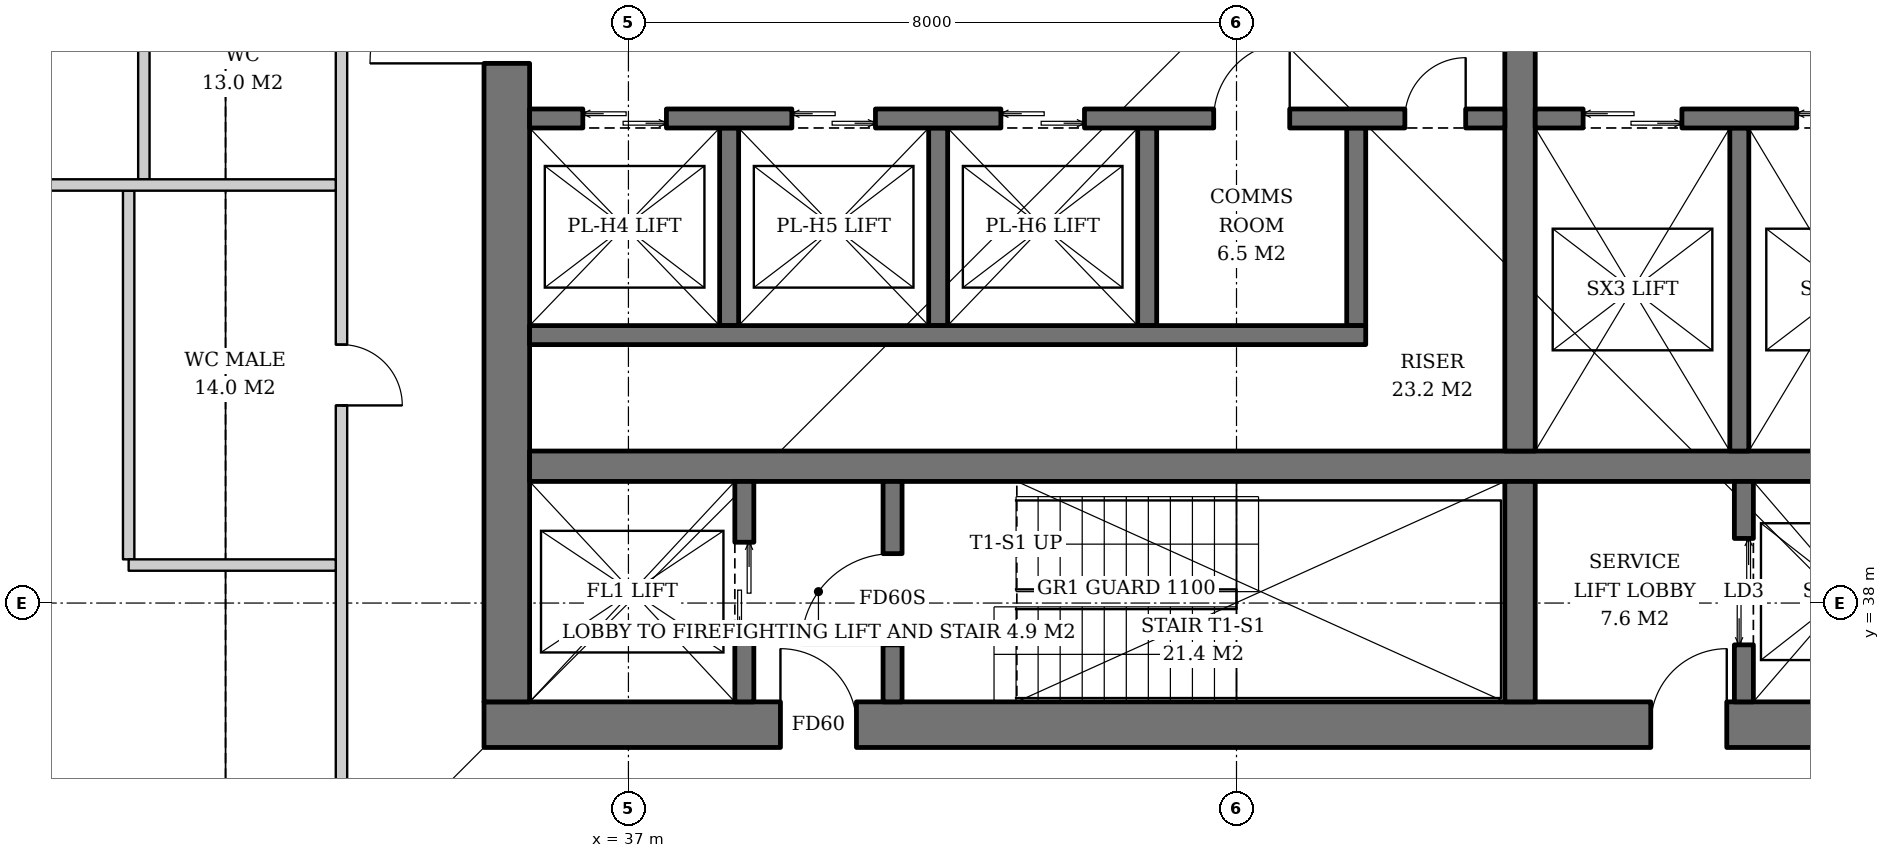
"""IFC4 building model, lengths in metres.
Left out: names, types, materials, properties, quantities, classifications, styles, units other than length and angle.
Written with IfcOpenShell. Run it as: python <this file> out.ifc"""

import sys

from ifc_helpers import new_model, si_unit, direction, frame, frame_2d, origin, place, context, subcontext, project, spatial, rectangle, extrude, element, fill, save


model = new_model("IFC4")
c1 = context("Model", 3, precision=1e-05, world=origin(), true_north=direction((0.0, 1.0)))
c2 = subcontext(c1, "Body", "Model", "MODEL_VIEW")
j1 = project(units=[si_unit("LENGTHUNIT", "METRE"), si_unit("PLANEANGLEUNIT", "RADIAN")], contexts=[c1])
p1 = place(None, origin())
s1 = spatial("IfcSite", under=j1, at=p1, CompositionType="ELEMENT")
p2 = place(p1, origin())
s2 = spatial("IfcBuilding", under=s1, at=p2, CompositionType="ELEMENT")
p3 = place(p2, frame((0.0, 0.0, 165.4)))
s3 = spatial("IfcBuildingStorey", under=s2, at=p3, CompositionType="ELEMENT", Elevation=165.4)
p4 = place(p3, frame((35.1, 36.4, 0.0), z_axis=(0.0, 0.0, 1.0), x_axis=(1.0, 0.0, 0.0)))
e1 = element("IfcWall", 1, at=p4, inside=s3, PredefinedType="SHEAR", context=c2, shape_type="SweptSolid", body=[
    extrude(rectangle(XDim=19.8, YDim=0.6, at=frame_2d((9.9, 0.0))), origin(), (0.0, 0.0, 1.0), 3.8),
])
p5 = place(p4, frame((3.9, 0.0, 0.0)))
e2 = element("IfcOpeningElement", 2, at=p5, cuts=e1, PredefinedType="OPENING", context=c2, shape_type="SweptSolid", body=[
    extrude(rectangle(XDim=1.0, YDim=2.1, at=frame_2d((0.5, 1.05))), frame((0.0, 0.31, 0.0), z_axis=(0.0, -1.0, 0.0), x_axis=(1.0, 0.0, 0.0)), (0.0, 0.0, 1.0), 0.62),
])
p6 = place(p4, frame((15.35, 0.0, 0.0)))
e3 = element("IfcOpeningElement", 3, at=p6, cuts=e1, PredefinedType="OPENING", context=c2, shape_type="SweptSolid", body=[
    extrude(rectangle(XDim=1.0, YDim=2.1, at=frame_2d((0.5, 1.05))), frame((0.0, 0.31, 0.0), z_axis=(0.0, -1.0, 0.0), x_axis=(1.0, 0.0, 0.0)), (0.0, 0.0, 1.0), 0.62),
])
p7 = place(p3, frame((35.4, 36.7, 0.0), z_axis=(0.0, 0.0, 1.0), x_axis=(0.0, 1.0, 0.0)))
e4 = element("IfcWall", 4, at=p7, inside=s3, PredefinedType="SHEAR", context=c2, shape_type="SweptSolid", body=[
    extrude(rectangle(XDim=18.6, YDim=0.6, at=frame_2d((9.3, 0.0))), origin(), (0.0, 0.0, 1.0), 3.8),
])
p8 = place(p7, frame((8.4, 0.0, 0.0)))
e5 = element("IfcOpeningElement", 5, at=p8, cuts=e4, PredefinedType="OPENING", context=c2, shape_type="SweptSolid", body=[
    extrude(rectangle(XDim=1.8, YDim=2.4, at=frame_2d((0.9, 1.2))), frame((0.0, 0.31, 0.0), z_axis=(0.0, -1.0, 0.0), x_axis=(1.0, 0.0, 0.0)), (0.0, 0.0, 1.0), 0.62),
])
p9 = place(p3, frame((35.7, 39.8, 0.0), z_axis=(0.0, 0.0, 1.0), x_axis=(1.0, 0.0, 0.0)))
e6 = element("IfcWall", 6, at=p9, inside=s3, PredefinedType="SHEAR", context=c2, shape_type="SweptSolid", body=[
    extrude(rectangle(XDim=18.6, YDim=0.4, at=frame_2d((9.3, 0.0))), origin(), (0.0, 0.0, 1.0), 3.8),
])
p10 = place(p3, frame((48.73, 36.7, 0.0), z_axis=(0.0, 0.0, 1.0), x_axis=(0.0, 1.0, 0.0)))
e7 = element("IfcWall", 7, at=p10, inside=s3, PredefinedType="SHEAR", context=c2, shape_type="SweptSolid", body=[
    extrude(rectangle(XDim=2.9, YDim=0.4, at=frame_2d((1.45, 0.0))), origin(), (0.0, 0.0, 1.0), 3.8),
])
p11 = place(p3, frame((48.73, 40.0, 0.0), z_axis=(0.0, 0.0, 1.0), x_axis=(0.0, 1.0, 0.0)))
e8 = element("IfcWall", 8, at=p11, inside=s3, PredefinedType="SHEAR", context=c2, shape_type="SweptSolid", body=[
    extrude(rectangle(XDim=12.0, YDim=0.4, at=frame_2d((6.0, 0.0))), origin(), (0.0, 0.0, 1.0), 3.8),
])
p12 = place(p3, frame((38.525, 36.7, 0.0), z_axis=(0.0, 0.0, 1.0), x_axis=(0.0, 1.0, 0.0)))
e9 = element("IfcWall", 9, at=p12, inside=s3, PredefinedType="SHEAR", context=c2, shape_type="SweptSolid", body=[
    extrude(rectangle(XDim=2.9, YDim=0.25, at=frame_2d((1.45, 0.0))), origin(), (0.0, 0.0, 1.0), 3.8),
])
p13 = place(p12, frame((0.8, 0.0, 0.0)))
e10 = element("IfcOpeningElement", 10, at=p13, cuts=e9, PredefinedType="OPENING", context=c2, shape_type="SweptSolid", body=[
    extrude(rectangle(XDim=1.3, YDim=2.2, at=frame_2d((0.65, 1.1))), frame((0.0, 0.135, 0.0), z_axis=(0.0, -1.0, 0.0), x_axis=(1.0, 0.0, 0.0)), (0.0, 0.0, 1.0), 0.27),
])
p14 = place(p3, frame((40.475, 36.7, 0.0), z_axis=(0.0, 0.0, 1.0), x_axis=(0.0, 1.0, 0.0)))
e11 = element("IfcWall", 11, at=p14, inside=s3, PredefinedType="SHEAR", context=c2, shape_type="SweptSolid", body=[
    extrude(rectangle(XDim=2.9, YDim=0.25, at=frame_2d((1.45, 0.0))), origin(), (0.0, 0.0, 1.0), 3.8),
])
p15 = place(p14, frame((0.75, 0.0, 0.0)))
e12 = element("IfcOpeningElement", 12, at=p15, cuts=e11, PredefinedType="OPENING", context=c2, shape_type="SweptSolid", body=[
    extrude(rectangle(XDim=1.2, YDim=2.1, at=frame_2d((0.6, 1.05))), frame((0.0, 0.135, 0.0), z_axis=(0.0, -1.0, 0.0), x_axis=(1.0, 0.0, 0.0)), (0.0, 0.0, 1.0), 0.27),
])
p16 = place(p3, frame((51.675, 36.7, 0.0), z_axis=(0.0, 0.0, 1.0), x_axis=(0.0, 1.0, 0.0)))
e13 = element("IfcWall", 13, at=p16, inside=s3, PredefinedType="SHEAR", context=c2, shape_type="SweptSolid", body=[
    extrude(rectangle(XDim=2.9, YDim=0.25, at=frame_2d((1.45, 0.0))), origin(), (0.0, 0.0, 1.0), 3.8),
])
p17 = place(p16, frame((0.75, 0.0, 0.0)))
e14 = element("IfcOpeningElement", 14, at=p17, cuts=e13, PredefinedType="OPENING", context=c2, shape_type="SweptSolid", body=[
    extrude(rectangle(XDim=1.4, YDim=2.4, at=frame_2d((0.7, 1.2))), frame((0.0, 0.135, 0.0), z_axis=(0.0, -1.0, 0.0), x_axis=(1.0, 0.0, 0.0)), (0.0, 0.0, 1.0), 0.27),
])
for number, where, z_axis, x_axis in (
    (15, (38.325, 44.25, 0.0), (0.0, 0.0, 1.0), (0.0, -1.0, 0.0)),
    (16, (41.075, 44.25, 0.0), (0.0, 0.0, 1.0), (0.0, -1.0, 0.0)),
    (17, (43.825, 44.25, 0.0), (0.0, 0.0, 1.0), (0.0, -1.0, 0.0)),
    (18, (46.575, 44.25, 0.0), (0.0, 0.0, 1.0), (0.0, -1.0, 0.0)),
):
    element("IfcWall", number, at=place(p3, frame(where, z_axis=z_axis, x_axis=x_axis)), inside=s3, PredefinedType="SHEAR", context=c2, shape_type="SweptSolid", body=[
        extrude(rectangle(XDim=2.6, YDim=0.25, at=frame_2d((1.3, 0.0))), origin(), (0.0, 0.0, 1.0), 3.8),
    ])
p18 = place(p3, frame((35.7, 41.525, 0.0), z_axis=(0.0, 0.0, 1.0), x_axis=(1.0, 0.0, 0.0)))
e19 = element("IfcWall", 19, at=p18, inside=s3, PredefinedType="SHEAR", context=c2, shape_type="SweptSolid", body=[
    extrude(rectangle(XDim=11.0, YDim=0.25, at=frame_2d((5.5, 0.0))), origin(), (0.0, 0.0, 1.0), 3.8),
])
p19 = place(p3, frame((35.7, 44.375, 0.0), z_axis=(0.0, 0.0, 1.0), x_axis=(1.0, 0.0, 0.0)))
e20 = element("IfcWall", 20, at=p19, inside=s3, PredefinedType="SHEAR", context=c2, shape_type="SweptSolid", body=[
    extrude(rectangle(XDim=12.83, YDim=0.25, at=frame_2d((6.415, 0.0))), origin(), (0.0, 0.0, 1.0), 3.8),
])
p20 = place(p19, frame((0.7, 0.0, 0.0)))
e21 = element("IfcOpeningElement", 21, at=p20, cuts=e20, PredefinedType="OPENING", context=c2, shape_type="SweptSolid", body=[
    extrude(rectangle(XDim=1.1, YDim=2.2, at=frame_2d((0.55, 1.1))), frame((0.0, 0.135, 0.0), z_axis=(0.0, -1.0, 0.0), x_axis=(1.0, 0.0, 0.0)), (0.0, 0.0, 1.0), 0.27),
])
p21 = place(p19, frame((3.45, 0.0, 0.0)))
e22 = element("IfcOpeningElement", 22, at=p21, cuts=e20, PredefinedType="OPENING", context=c2, shape_type="SweptSolid", body=[
    extrude(rectangle(XDim=1.1, YDim=2.2, at=frame_2d((0.55, 1.1))), frame((0.0, 0.135, 0.0), z_axis=(0.0, -1.0, 0.0), x_axis=(1.0, 0.0, 0.0)), (0.0, 0.0, 1.0), 0.27),
])
p22 = place(p19, frame((6.2, 0.0, 0.0)))
e23 = element("IfcOpeningElement", 23, at=p22, cuts=e20, PredefinedType="OPENING", context=c2, shape_type="SweptSolid", body=[
    extrude(rectangle(XDim=1.1, YDim=2.2, at=frame_2d((0.55, 1.1))), frame((0.0, 0.135, 0.0), z_axis=(0.0, -1.0, 0.0), x_axis=(1.0, 0.0, 0.0)), (0.0, 0.0, 1.0), 0.27),
])
p23 = place(p19, frame((9.0, 0.0, 0.0)))
e24 = element("IfcOpeningElement", 24, at=p23, cuts=e20, PredefinedType="OPENING", context=c2, shape_type="SweptSolid", body=[
    extrude(rectangle(XDim=1.0, YDim=2.1, at=frame_2d((0.5, 1.05))), frame((0.0, 0.135, 0.0), z_axis=(0.0, -1.0, 0.0), x_axis=(1.0, 0.0, 0.0)), (0.0, 0.0, 1.0), 0.27),
])
p24 = place(p19, frame((11.515, 0.0, 0.0)))
e25 = element("IfcOpeningElement", 25, at=p24, cuts=e20, PredefinedType="OPENING", context=c2, shape_type="SweptSolid", body=[
    extrude(rectangle(XDim=0.8, YDim=2.0, at=frame_2d((0.4, 1.0))), frame((0.0, 0.135, 0.0), z_axis=(0.0, -1.0, 0.0), x_axis=(1.0, 0.0, 0.0)), (0.0, 0.0, 1.0), 0.27),
])
p25 = place(p3, frame((51.615, 44.25, 0.0), z_axis=(0.0, 0.0, 1.0), x_axis=(0.0, -1.0, 0.0)))
e26 = element("IfcWall", 26, at=p25, inside=s3, PredefinedType="SHEAR", context=c2, shape_type="SweptSolid", body=[
    extrude(rectangle(XDim=4.25, YDim=0.25, at=frame_2d((2.125, 0.0))), origin(), (0.0, 0.0, 1.0), 3.8),
])
p26 = place(p3, frame((48.93, 44.375, 0.0), z_axis=(0.0, 0.0, 1.0), x_axis=(1.0, 0.0, 0.0)))
e27 = element("IfcWall", 27, at=p26, inside=s3, PredefinedType="SHEAR", context=c2, shape_type="SweptSolid", body=[
    extrude(rectangle(XDim=5.37, YDim=0.25, at=frame_2d((2.685, 0.0))), origin(), (0.0, 0.0, 1.0), 3.8),
])
p27 = place(p26, frame((0.63, 0.0, 0.0)))
e28 = element("IfcOpeningElement", 28, at=p27, cuts=e27, PredefinedType="OPENING", context=c2, shape_type="SweptSolid", body=[
    extrude(rectangle(XDim=1.3, YDim=2.2, at=frame_2d((0.65, 1.1))), frame((0.0, 0.135, 0.0), z_axis=(0.0, -1.0, 0.0), x_axis=(1.0, 0.0, 0.0)), (0.0, 0.0, 1.0), 0.27),
])
p28 = place(p26, frame((3.44, 0.0, 0.0)))
e29 = element("IfcOpeningElement", 29, at=p28, cuts=e27, PredefinedType="OPENING", context=c2, shape_type="SweptSolid", body=[
    extrude(rectangle(XDim=1.3, YDim=2.2, at=frame_2d((0.65, 1.1))), frame((0.0, 0.135, 0.0), z_axis=(0.0, -1.0, 0.0), x_axis=(1.0, 0.0, 0.0)), (0.0, 0.0, 1.0), 0.27),
])
for number, where, z_axis, x_axis in (
    (30, (30.625, 48.425, 0.0), (0.0, 0.0, 1.0), (0.0, -1.0, 0.0)),
    (31, (30.425, 43.425, 0.0), (0.0, 0.0, 1.0), (0.0, -1.0, 0.0)),
):
    element("IfcWall", number, at=place(p3, frame(where, z_axis=z_axis, x_axis=x_axis)), inside=s3, PredefinedType="PARTITIONING", context=c2, shape_type="SweptSolid", body=[
        extrude(rectangle(XDim=4.85, YDim=0.15, at=frame_2d((2.425, 0.0))), origin(), (0.0, 0.0, 1.0), 2.85),
    ])
p29 = place(p3, frame((33.225, 57.85, 0.0), z_axis=(0.0, 0.0, 1.0), x_axis=(0.0, -1.0, 0.0)))
e32 = element("IfcWall", 32, at=p29, inside=s3, PredefinedType="PARTITIONING", context=c2, shape_type="SweptSolid", body=[
    extrude(rectangle(XDim=23.55, YDim=0.15, at=frame_2d((11.775, 0.0))), origin(), (0.0, 0.0, 1.0), 2.85),
])
p30 = place(p29, frame((6.45, 0.0, 0.0)))
e33 = element("IfcOpeningElement", 33, at=p30, cuts=e32, PredefinedType="OPENING", context=c2, shape_type="SweptSolid", body=[
    extrude(rectangle(XDim=0.8, YDim=2.1, at=frame_2d((0.4, 1.05))), frame((0.0, 0.085, 0.0), z_axis=(0.0, -1.0, 0.0), x_axis=(1.0, 0.0, 0.0)), (0.0, 0.0, 1.0), 0.17),
])
p31 = place(p29, frame((11.35, 0.0, 0.0)))
e34 = element("IfcOpeningElement", 34, at=p31, cuts=e32, PredefinedType="OPENING", context=c2, shape_type="SweptSolid", body=[
    extrude(rectangle(XDim=1.0, YDim=2.1, at=frame_2d((0.5, 1.05))), frame((0.0, 0.085, 0.0), z_axis=(0.0, -1.0, 0.0), x_axis=(1.0, 0.0, 0.0)), (0.0, 0.0, 1.0), 0.17),
])
p32 = place(p29, frame((16.45, 0.0, 0.0)))
e35 = element("IfcOpeningElement", 35, at=p32, cuts=e32, PredefinedType="OPENING", context=c2, shape_type="SweptSolid", body=[
    extrude(rectangle(XDim=0.8, YDim=2.1, at=frame_2d((0.4, 1.05))), frame((0.0, 0.085, 0.0), z_axis=(0.0, -1.0, 0.0), x_axis=(1.0, 0.0, 0.0)), (0.0, 0.0, 1.0), 0.17),
])
p33 = place(p29, frame((1.3, 0.0, 0.0)))
e36 = element("IfcOpeningElement", 36, at=p33, cuts=e32, PredefinedType="OPENING", context=c2, shape_type="SweptSolid", body=[
    extrude(rectangle(XDim=1.8, YDim=2.4, at=frame_2d((0.9, 1.2))), frame((0.0, 0.085, 0.0), z_axis=(0.0, -1.0, 0.0), x_axis=(1.0, 0.0, 0.0)), (0.0, 0.0, 1.0), 0.17),
])
p34 = place(p3, frame((33.15, 43.5, 0.0), z_axis=(0.0, 0.0, 1.0), x_axis=(-1.0, 0.0, 0.0)))
e37 = element("IfcWall", 37, at=p34, inside=s3, PredefinedType="PARTITIONING", context=c2, shape_type="SweptSolid", body=[
    extrude(rectangle(XDim=6.45, YDim=0.15, at=frame_2d((3.225, 0.0))), origin(), (0.0, 0.0, 1.0), 3.62),
])
p35 = place(p3, frame((33.15, 38.5, 0.0), z_axis=(0.0, 0.0, 1.0), x_axis=(-1.0, 0.0, 0.0)))
e38 = element("IfcWall", 38, at=p35, inside=s3, PredefinedType="PARTITIONING", context=c2, shape_type="SweptSolid", body=[
    extrude(rectangle(XDim=2.725, YDim=0.15, at=frame_2d((1.362, 0.0))), origin(), (0.0, 0.0, 1.0), 3.62),
])
p36 = place(p13, origin())
e39 = element("IfcDoor", 39, at=p36, inside=s3, OperationType="DOUBLE_DOOR_SLIDING", PredefinedType="DOOR", context=c2, shape_type="SweptSolid", body=[
    extrude(rectangle(XDim=1.3, YDim=2.2, at=frame_2d((0.65, 1.1))), frame((0.0, 0.025, 0.0), z_axis=(0.0, -1.0, 0.0), x_axis=(1.0, 0.0, 0.0)), (0.0, 0.0, 1.0), 0.05),
])
fill(e10, e39)
p37 = place(p15, origin())
e40 = element("IfcDoor", 40, at=p37, inside=s3, OperationType="SINGLE_SWING_LEFT", PredefinedType="DOOR", context=c2, shape_type="SweptSolid", body=[
    extrude(rectangle(XDim=1.2, YDim=2.1, at=frame_2d((0.6, 1.05))), frame((0.0, 0.025, 0.0), z_axis=(0.0, -1.0, 0.0), x_axis=(1.0, 0.0, 0.0)), (0.0, 0.0, 1.0), 0.05),
])
fill(e12, e40)
p38 = place(p17, origin())
e41 = element("IfcDoor", 41, at=p38, inside=s3, OperationType="DOUBLE_DOOR_SLIDING", PredefinedType="DOOR", context=c2, shape_type="SweptSolid", body=[
    extrude(rectangle(XDim=1.4, YDim=2.4, at=frame_2d((0.7, 1.2))), frame((0.0, 0.025, 0.0), z_axis=(0.0, -1.0, 0.0), x_axis=(1.0, 0.0, 0.0)), (0.0, 0.0, 1.0), 0.05),
])
fill(e14, e41)
p39 = place(p20, origin())
e42 = element("IfcDoor", 42, at=p39, inside=s3, OperationType="DOUBLE_DOOR_SLIDING", PredefinedType="DOOR", context=c2, shape_type="SweptSolid", body=[
    extrude(rectangle(XDim=1.1, YDim=2.2, at=frame_2d((0.55, 1.1))), frame((0.0, 0.025, 0.0), z_axis=(0.0, -1.0, 0.0), x_axis=(1.0, 0.0, 0.0)), (0.0, 0.0, 1.0), 0.05),
])
fill(e21, e42)
p40 = place(p21, origin())
e43 = element("IfcDoor", 43, at=p40, inside=s3, OperationType="DOUBLE_DOOR_SLIDING", PredefinedType="DOOR", context=c2, shape_type="SweptSolid", body=[
    extrude(rectangle(XDim=1.1, YDim=2.2, at=frame_2d((0.55, 1.1))), frame((0.0, 0.025, 0.0), z_axis=(0.0, -1.0, 0.0), x_axis=(1.0, 0.0, 0.0)), (0.0, 0.0, 1.0), 0.05),
])
fill(e22, e43)
p41 = place(p22, origin())
e44 = element("IfcDoor", 44, at=p41, inside=s3, OperationType="DOUBLE_DOOR_SLIDING", PredefinedType="DOOR", context=c2, shape_type="SweptSolid", body=[
    extrude(rectangle(XDim=1.1, YDim=2.2, at=frame_2d((0.55, 1.1))), frame((0.0, 0.025, 0.0), z_axis=(0.0, -1.0, 0.0), x_axis=(1.0, 0.0, 0.0)), (0.0, 0.0, 1.0), 0.05),
])
fill(e23, e44)
p42 = place(p23, origin())
e45 = element("IfcDoor", 45, at=p42, inside=s3, OperationType="SINGLE_SWING_RIGHT", PredefinedType="DOOR", context=c2, shape_type="SweptSolid", body=[
    extrude(rectangle(XDim=1.0, YDim=2.1, at=frame_2d((0.5, 1.05))), frame((0.0, 0.025, 0.0), z_axis=(0.0, -1.0, 0.0), x_axis=(1.0, 0.0, 0.0)), (0.0, 0.0, 1.0), 0.05),
])
fill(e24, e45)
p43 = place(p24, origin())
e46 = element("IfcDoor", 46, at=p43, inside=s3, OperationType="SINGLE_SWING_RIGHT", PredefinedType="DOOR", context=c2, shape_type="SweptSolid", body=[
    extrude(rectangle(XDim=0.8, YDim=2.0, at=frame_2d((0.4, 1.0))), frame((0.0, 0.025, 0.0), z_axis=(0.0, -1.0, 0.0), x_axis=(1.0, 0.0, 0.0)), (0.0, 0.0, 1.0), 0.05),
])
fill(e25, e46)
p44 = place(p27, origin())
e47 = element("IfcDoor", 47, at=p44, inside=s3, OperationType="DOUBLE_DOOR_SLIDING", PredefinedType="DOOR", context=c2, shape_type="SweptSolid", body=[
    extrude(rectangle(XDim=1.3, YDim=2.2, at=frame_2d((0.65, 1.1))), frame((0.0, 0.025, 0.0), z_axis=(0.0, -1.0, 0.0), x_axis=(1.0, 0.0, 0.0)), (0.0, 0.0, 1.0), 0.05),
])
fill(e28, e47)
p45 = place(p28, origin())
e48 = element("IfcDoor", 48, at=p45, inside=s3, OperationType="DOUBLE_DOOR_SLIDING", PredefinedType="DOOR", context=c2, shape_type="SweptSolid", body=[
    extrude(rectangle(XDim=1.3, YDim=2.2, at=frame_2d((0.65, 1.1))), frame((0.0, 0.025, 0.0), z_axis=(0.0, -1.0, 0.0), x_axis=(1.0, 0.0, 0.0)), (0.0, 0.0, 1.0), 0.05),
])
fill(e29, e48)
p46 = place(p5, origin())
e49 = element("IfcDoor", 49, at=p46, inside=s3, OperationType="SINGLE_SWING_LEFT", PredefinedType="DOOR", context=c2, shape_type="SweptSolid", body=[
    extrude(rectangle(XDim=1.0, YDim=2.1, at=frame_2d((0.5, 1.05))), frame((0.0, 0.025, 0.0), z_axis=(0.0, -1.0, 0.0), x_axis=(1.0, 0.0, 0.0)), (0.0, 0.0, 1.0), 0.05),
])
fill(e2, e49)
p47 = place(p8, origin())
e50 = element("IfcDoor", 50, at=p47, inside=s3, OperationType="DOUBLE_DOOR_SINGLE_SWING", PredefinedType="DOOR", context=c2, shape_type="SweptSolid", body=[
    extrude(rectangle(XDim=1.8, YDim=2.4, at=frame_2d((0.9, 1.2))), frame((0.0, 0.025, 0.0), z_axis=(0.0, -1.0, 0.0), x_axis=(1.0, 0.0, 0.0)), (0.0, 0.0, 1.0), 0.05),
])
fill(e5, e50)
p48 = place(p6, origin())
e51 = element("IfcDoor", 51, at=p48, inside=s3, OperationType="SINGLE_SWING_RIGHT", PredefinedType="DOOR", context=c2, shape_type="SweptSolid", body=[
    extrude(rectangle(XDim=1.0, YDim=2.1, at=frame_2d((0.5, 1.05))), frame((0.0, 0.025, 0.0), z_axis=(0.0, -1.0, 0.0), x_axis=(1.0, 0.0, 0.0)), (0.0, 0.0, 1.0), 0.05),
])
fill(e3, e51)
p49 = place(p32, origin())
e52 = element("IfcDoor", 52, at=p49, inside=s3, OperationType="SINGLE_SWING_RIGHT", PredefinedType="DOOR", context=c2, shape_type="SweptSolid", body=[
    extrude(rectangle(XDim=0.8, YDim=2.1, at=frame_2d((0.4, 1.05))), frame((0.0, 0.025, 0.0), z_axis=(0.0, -1.0, 0.0), x_axis=(1.0, 0.0, 0.0)), (0.0, 0.0, 1.0), 0.05),
])
fill(e35, e52)
save(model, sys.argv[1])
